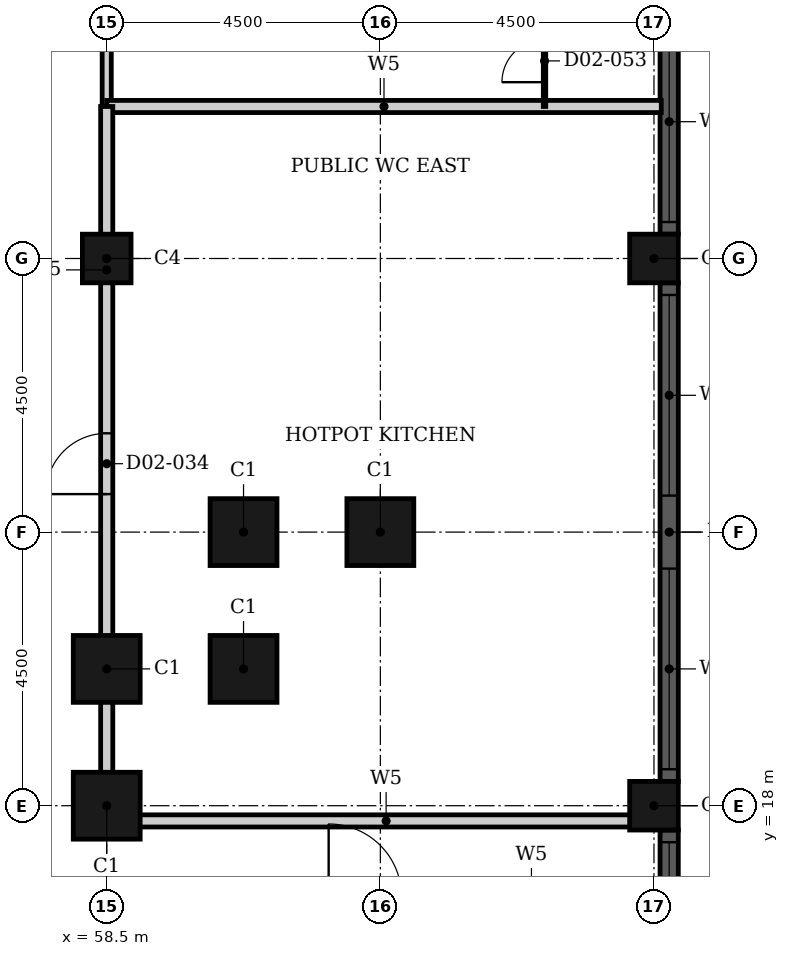
"""IFC4 building model, lengths in metres.
Left out: names, types, materials, properties, quantities, classifications, styles, units other than length and angle.
Written with IfcOpenShell. Run it as: python <this file> out.ifc"""

import sys

from ifc_helpers import new_model, si_unit, direction, frame, frame_2d, origin, origin_2d, place, context, subcontext, project, spatial, rectangle, hollow_rectangle, extrude, element, fill, save


model = new_model("IFC4")
c1 = context("Model", 3, precision=1e-05, world=origin(), true_north=direction((0.0, 1.0)))
c2 = subcontext(c1, "Body", "Model", "MODEL_VIEW")
j1 = project(units=[si_unit("LENGTHUNIT", "METRE"), si_unit("PLANEANGLEUNIT", "RADIAN")], contexts=[c1])
p1 = place(None, origin())
s1 = spatial("IfcSite", under=j1, at=p1, CompositionType="ELEMENT")
p2 = place(p1, origin())
s2 = spatial("IfcBuilding", under=s1, at=p2, CompositionType="ELEMENT")
p3 = place(p2, frame((0.0, 0.0, 12.0)))
s3 = spatial("IfcBuildingStorey", under=s2, at=p3, CompositionType="ELEMENT", Elevation=12.0)
for number, where, z_axis, x_axis in (
    (1, (58.5, 18.0, 0.0), (0.0, 0.0, 1.0), (1.0, 0.0, 0.0)),
    (2, (58.5, 20.25, 0.0), (0.0, 0.0, 1.0), (1.0, 0.0, 0.0)),
    (3, (60.75, 20.25, 0.0), (0.0, 0.0, 1.0), (1.0, 0.0, 0.0)),
    (4, (60.75, 22.5, 0.0), (0.0, 0.0, 1.0), (1.0, 0.0, 0.0)),
    (5, (63.0, 22.5, 0.0), (0.0, 0.0, 1.0), (1.0, 0.0, 0.0)),
):
    element("IfcColumn", number, at=place(p3, frame(where, z_axis=z_axis, x_axis=x_axis)), inside=s3, PredefinedType="COLUMN", context=c2, shape_type="SweptSolid", body=[
        extrude(hollow_rectangle(XDim=1.1, YDim=1.1, WallThickness=0.036, at=origin_2d()), origin(), (0.0, 0.0, 1.0), 5.4),
    ])
for number, where, z_axis, x_axis in (
    (6, (67.5, 18.0, 0.0), (0.0, 0.0, 1.0), (1.0, 0.0, 0.0)),
    (7, (67.5, 27.0, 0.0), (0.0, 0.0, 1.0), (1.0, 0.0, 0.0)),
    (8, (58.5, 27.0, 0.0), (0.0, 0.0, 1.0), (1.0, 0.0, 0.0)),
):
    element("IfcColumn", number, at=place(p3, frame(where, z_axis=z_axis, x_axis=x_axis)), inside=s3, PredefinedType="COLUMN", context=c2, shape_type="SweptSolid", body=[
        extrude(hollow_rectangle(XDim=0.8, YDim=0.8, WallThickness=0.025, at=origin_2d()), origin(), (0.0, 0.0, 1.0), 5.4),
    ])
p4 = place(p3, frame((67.75, 9.4, 0.0), z_axis=(0.0, 0.0, 1.0), x_axis=(0.0, 1.0, 0.0)))
e9 = element("IfcWall", 9, at=p4, inside=s3, PredefinedType="SOLIDWALL", context=c2, shape_type="SweptSolid", body=[
    extrude(rectangle(XDim=8.2, YDim=0.3, at=frame_2d((4.1, 0.0))), origin(), (0.0, 0.0, 1.0), 5.4),
])
p5 = place(p4, frame((0.2, 0.0, 0.9)))
e10 = element("IfcOpeningElement", 10, at=p5, cuts=e9, PredefinedType="OPENING", context=c2, shape_type="SweptSolid", body=[
    extrude(rectangle(XDim=3.3, YDim=3.5, at=frame_2d((1.65, 1.75))), frame((0.0, 0.16, 0.0), z_axis=(0.0, -1.0, 0.0), x_axis=(1.0, 0.0, 0.0)), (0.0, 0.0, 1.0), 0.32),
])
p6 = place(p4, frame((4.7, 0.0, 0.9)))
e11 = element("IfcOpeningElement", 11, at=p6, cuts=e9, PredefinedType="OPENING", context=c2, shape_type="SweptSolid", body=[
    extrude(rectangle(XDim=3.3, YDim=3.5, at=frame_2d((1.65, 1.75))), frame((0.0, 0.16, 0.0), z_axis=(0.0, -1.0, 0.0), x_axis=(1.0, 0.0, 0.0)), (0.0, 0.0, 1.0), 0.32),
])
p7 = place(p3, frame((67.75, 18.4, 0.0), z_axis=(0.0, 0.0, 1.0), x_axis=(0.0, 1.0, 0.0)))
e12 = element("IfcWall", 12, at=p7, inside=s3, PredefinedType="SOLIDWALL", context=c2, shape_type="SweptSolid", body=[
    extrude(rectangle(XDim=8.2, YDim=0.3, at=frame_2d((4.1, 0.0))), origin(), (0.0, 0.0, 1.0), 5.4),
])
p8 = place(p7, frame((0.2, 0.0, 0.9)))
e13 = element("IfcOpeningElement", 13, at=p8, cuts=e12, PredefinedType="OPENING", context=c2, shape_type="SweptSolid", body=[
    extrude(rectangle(XDim=3.3, YDim=3.5, at=frame_2d((1.65, 1.75))), frame((0.0, 0.16, 0.0), z_axis=(0.0, -1.0, 0.0), x_axis=(1.0, 0.0, 0.0)), (0.0, 0.0, 1.0), 0.32),
])
p9 = place(p7, frame((4.7, 0.0, 0.9)))
e14 = element("IfcOpeningElement", 14, at=p9, cuts=e12, PredefinedType="OPENING", context=c2, shape_type="SweptSolid", body=[
    extrude(rectangle(XDim=3.3, YDim=3.5, at=frame_2d((1.65, 1.75))), frame((0.0, 0.16, 0.0), z_axis=(0.0, -1.0, 0.0), x_axis=(1.0, 0.0, 0.0)), (0.0, 0.0, 1.0), 0.32),
])
p10 = place(p3, frame((67.75, 27.4, 0.0), z_axis=(0.0, 0.0, 1.0), x_axis=(0.0, 1.0, 0.0)))
e15 = element("IfcWall", 15, at=p10, inside=s3, PredefinedType="SOLIDWALL", context=c2, shape_type="SweptSolid", body=[
    extrude(rectangle(XDim=8.2, YDim=0.3, at=frame_2d((4.1, 0.0))), origin(), (0.0, 0.0, 1.0), 5.4),
])
p11 = place(p10, frame((0.2, 0.0, 0.9)))
e16 = element("IfcOpeningElement", 16, at=p11, cuts=e15, PredefinedType="OPENING", context=c2, shape_type="SweptSolid", body=[
    extrude(rectangle(XDim=3.3, YDim=3.5, at=frame_2d((1.65, 1.75))), frame((0.0, 0.16, 0.0), z_axis=(0.0, -1.0, 0.0), x_axis=(1.0, 0.0, 0.0)), (0.0, 0.0, 1.0), 0.32),
])
p12 = place(p10, frame((4.7, 0.0, 0.9)))
e17 = element("IfcOpeningElement", 17, at=p12, cuts=e15, PredefinedType="OPENING", context=c2, shape_type="SweptSolid", body=[
    extrude(rectangle(XDim=3.3, YDim=3.5, at=frame_2d((1.65, 1.75))), frame((0.0, 0.16, 0.0), z_axis=(0.0, -1.0, 0.0), x_axis=(1.0, 0.0, 0.0)), (0.0, 0.0, 1.0), 0.32),
])
p13 = place(p3, frame((58.5, 29.5, 0.0), z_axis=(0.0, 0.0, 1.0), x_axis=(0.0, 1.0, 0.0)))
e18 = element("IfcWall", 18, at=p13, inside=s3, PredefinedType="PARTITIONING", context=c2, shape_type="SweptSolid", body=[
    extrude(rectangle(XDim=4.5, YDim=0.15, at=frame_2d((2.25, 0.0))), origin(), (0.0, 0.0, 1.0), 5.05),
])
p14 = place(p3, frame((58.5, 17.75, 0.0), z_axis=(0.0, 0.0, 1.0), x_axis=(1.0, 0.0, 0.0)))
e19 = element("IfcWall", 19, at=p14, inside=s3, PredefinedType="PARTITIONING", context=c2, shape_type="SweptSolid", body=[
    extrude(rectangle(XDim=9.19, YDim=0.2, at=frame_2d((4.595, 0.0))), origin(), (0.0, 0.0, 1.0), 5.05),
])
p15 = place(p3, frame((58.5, 29.5, 0.0), z_axis=(0.0, 0.0, 1.0), x_axis=(1.0, 0.0, 0.0)))
e20 = element("IfcWall", 20, at=p15, inside=s3, PredefinedType="PARTITIONING", context=c2, shape_type="SweptSolid", body=[
    extrude(rectangle(XDim=9.12, YDim=0.2, at=frame_2d((4.56, 0.0))), origin(), (0.0, 0.0, 1.0), 5.05),
])
p16 = place(p3, frame((58.5, 17.75, 0.0), z_axis=(0.0, 0.0, 1.0), x_axis=(0.0, 1.0, 0.0)))
e21 = element("IfcWall", 21, at=p16, inside=s3, PredefinedType="PARTITIONING", context=c2, shape_type="SweptSolid", body=[
    extrude(rectangle(XDim=11.75, YDim=0.2, at=frame_2d((5.875, 0.0))), origin(), (0.0, 0.0, 1.0), 5.05),
])
p17 = place(p16, frame((5.375, 0.0, 0.0)))
e22 = element("IfcOpeningElement", 22, at=p17, cuts=e21, PredefinedType="OPENING", context=c2, shape_type="SweptSolid", body=[
    extrude(rectangle(XDim=1.0, YDim=2.1, at=frame_2d((0.5, 1.05))), frame((0.0, 0.11, 0.0), z_axis=(0.0, -1.0, 0.0), x_axis=(1.0, 0.0, 0.0)), (0.0, 0.0, 1.0), 0.22),
])
p18 = place(p3, frame((65.7, 29.5, 0.0), z_axis=(0.0, 0.0, 1.0), x_axis=(0.0, 1.0, 0.0)))
e23 = element("IfcWall", 23, at=p18, inside=s3, PredefinedType="PARTITIONING", context=c2, shape_type="SweptSolid", body=[
    extrude(rectangle(XDim=4.5, YDim=0.04, at=frame_2d((2.25, 0.0))), origin(), (0.0, 0.0, 1.0), 5.05),
])
p19 = place(p18, frame((0.4, 0.0, 0.0)))
e24 = element("IfcOpeningElement", 24, at=p19, cuts=e23, PredefinedType="OPENING", context=c2, shape_type="SweptSolid", body=[
    extrude(rectangle(XDim=0.7, YDim=2.0, at=frame_2d((0.35, 1.0))), frame((0.0, 0.03, 0.0), z_axis=(0.0, -1.0, 0.0), x_axis=(1.0, 0.0, 0.0)), (0.0, 0.0, 1.0), 0.06),
])
p20 = place(p18, frame((1.9, 0.0, 0.0)))
e25 = element("IfcOpeningElement", 25, at=p20, cuts=e23, PredefinedType="OPENING", context=c2, shape_type="SweptSolid", body=[
    extrude(rectangle(XDim=0.7, YDim=2.0, at=frame_2d((0.35, 1.0))), frame((0.0, 0.03, 0.0), z_axis=(0.0, -1.0, 0.0), x_axis=(1.0, 0.0, 0.0)), (0.0, 0.0, 1.0), 0.06),
])
p21 = place(p18, frame((3.3, 0.0, 0.0)))
e26 = element("IfcOpeningElement", 26, at=p21, cuts=e23, PredefinedType="OPENING", context=c2, shape_type="SweptSolid", body=[
    extrude(rectangle(XDim=0.9, YDim=2.0, at=frame_2d((0.45, 1.0))), frame((0.0, 0.03, 0.0), z_axis=(0.0, -1.0, 0.0), x_axis=(1.0, 0.0, 0.0)), (0.0, 0.0, 1.0), 0.06),
])
p22 = place(p6, origin())
e27 = element("IfcWindow", 27, at=p22, inside=s3, PartitioningType="SINGLE_PANEL", PredefinedType="WINDOW", context=c2, shape_type="SweptSolid", body=[
    extrude(rectangle(XDim=3.3, YDim=3.5, at=frame_2d((1.65, 1.75))), frame((0.0, 0.03, 0.0), z_axis=(0.0, -1.0, 0.0), x_axis=(1.0, 0.0, 0.0)), (0.0, 0.0, 1.0), 0.06),
])
fill(e11, e27)
p23 = place(p8, origin())
e28 = element("IfcWindow", 28, at=p23, inside=s3, PartitioningType="SINGLE_PANEL", PredefinedType="WINDOW", context=c2, shape_type="SweptSolid", body=[
    extrude(rectangle(XDim=3.3, YDim=3.5, at=frame_2d((1.65, 1.75))), frame((0.0, 0.03, 0.0), z_axis=(0.0, -1.0, 0.0), x_axis=(1.0, 0.0, 0.0)), (0.0, 0.0, 1.0), 0.06),
])
fill(e13, e28)
p24 = place(p9, origin())
e29 = element("IfcWindow", 29, at=p24, inside=s3, PartitioningType="SINGLE_PANEL", PredefinedType="WINDOW", context=c2, shape_type="SweptSolid", body=[
    extrude(rectangle(XDim=3.3, YDim=3.5, at=frame_2d((1.65, 1.75))), frame((0.0, 0.03, 0.0), z_axis=(0.0, -1.0, 0.0), x_axis=(1.0, 0.0, 0.0)), (0.0, 0.0, 1.0), 0.06),
])
fill(e14, e29)
p25 = place(p11, origin())
e30 = element("IfcWindow", 30, at=p25, inside=s3, PartitioningType="SINGLE_PANEL", PredefinedType="WINDOW", context=c2, shape_type="SweptSolid", body=[
    extrude(rectangle(XDim=3.3, YDim=3.5, at=frame_2d((1.65, 1.75))), frame((0.0, 0.03, 0.0), z_axis=(0.0, -1.0, 0.0), x_axis=(1.0, 0.0, 0.0)), (0.0, 0.0, 1.0), 0.06),
])
fill(e16, e30)
p26 = place(p17, origin())
e31 = element("IfcDoor", 31, at=p26, inside=s3, OperationType="SINGLE_SWING_LEFT", PredefinedType="DOOR", context=c2, shape_type="SweptSolid", body=[
    extrude(rectangle(XDim=1.0, YDim=2.1, at=frame_2d((0.5, 1.05))), frame((0.0, 0.025, 0.0), z_axis=(0.0, -1.0, 0.0), x_axis=(1.0, 0.0, 0.0)), (0.0, 0.0, 1.0), 0.05),
])
fill(e22, e31)
p27 = place(p19, origin())
e32 = element("IfcDoor", 32, at=p27, inside=s3, OperationType="SINGLE_SWING_LEFT", PredefinedType="DOOR", context=c2, shape_type="SweptSolid", body=[
    extrude(rectangle(XDim=0.7, YDim=2.0, at=frame_2d((0.35, 1.0))), frame((0.0, 0.02, 0.0), z_axis=(0.0, -1.0, 0.0), x_axis=(1.0, 0.0, 0.0)), (0.0, 0.0, 1.0), 0.04),
])
fill(e24, e32)
save(model, sys.argv[1])
